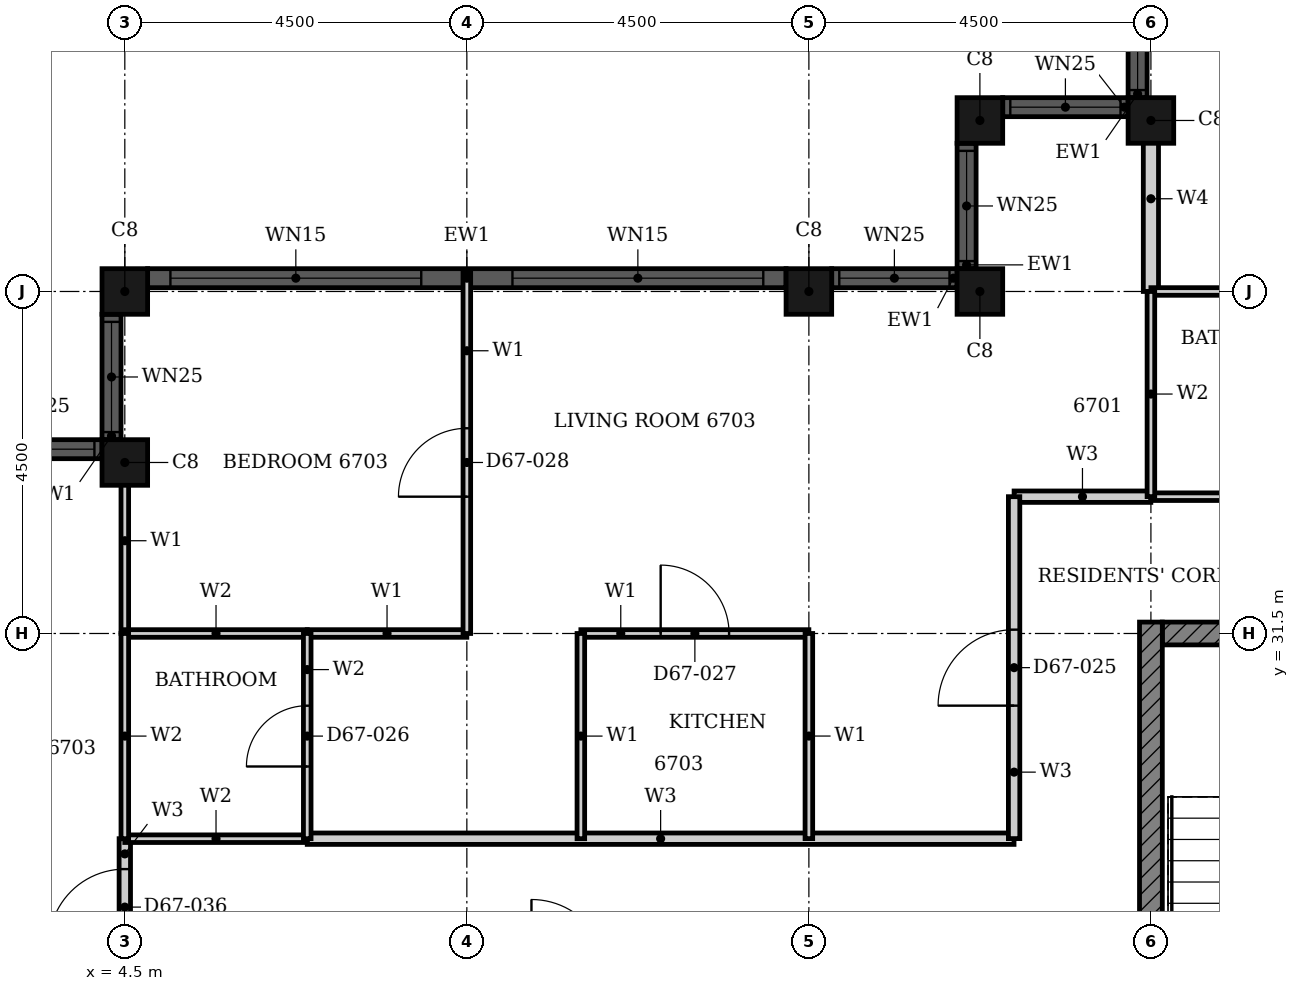
"""IFC4 building model, lengths in metres.
Left out: names, types, materials, properties, quantities, classifications, styles, units other than length and angle.
Written with IfcOpenShell. Run it as: python <this file> out.ifc"""

import sys

from ifc_helpers import new_model, si_unit, direction, frame, frame_2d, origin, origin_2d, place, context, subcontext, project, spatial, rectangle, hollow_rectangle, extrude, element, fill, save


model = new_model("IFC4")
c1 = context("Model", 3, precision=1e-05, world=origin(), true_north=direction((0.0, 1.0)))
c2 = subcontext(c1, "Body", "Model", "MODEL_VIEW")
j1 = project(units=[si_unit("LENGTHUNIT", "METRE"), si_unit("PLANEANGLEUNIT", "RADIAN")], contexts=[c1])
p1 = place(None, origin())
s1 = spatial("IfcSite", under=j1, at=p1, CompositionType="ELEMENT")
p2 = place(p1, origin())
s2 = spatial("IfcBuilding", under=s1, at=p2, CompositionType="ELEMENT")
p3 = place(p2, frame((0.0, 0.0, 263.8)))
s3 = spatial("IfcBuildingStorey", under=s2, at=p3, CompositionType="ELEMENT", Elevation=263.8)
for number, where, z_axis, x_axis in (
    (1, (18.0, 38.25, 0.0), (0.0, 0.0, 1.0), (1.0, 0.0, 0.0)),
    (2, (15.75, 38.25, 0.0), (0.0, 0.0, 1.0), (1.0, 0.0, 0.0)),
    (3, (15.75, 36.0, 0.0), (0.0, 0.0, 1.0), (1.0, 0.0, 0.0)),
    (4, (13.5, 36.0, 0.0), (0.0, 0.0, 1.0), (1.0, 0.0, 0.0)),
    (5, (4.5, 36.0, 0.0), (0.0, 0.0, 1.0), (1.0, 0.0, 0.0)),
    (6, (4.5, 33.75, 0.0), (0.0, 0.0, 1.0), (1.0, 0.0, 0.0)),
):
    element("IfcColumn", number, at=place(p3, frame(where, z_axis=z_axis, x_axis=x_axis)), inside=s3, PredefinedType="COLUMN", context=c2, shape_type="SweptSolid", body=[
        extrude(hollow_rectangle(XDim=0.6, YDim=0.6, WallThickness=0.02, at=origin_2d()), origin(), (0.0, 0.0, 1.0), 3.7),
    ])
p4 = place(p3, frame((17.825, 40.2, 0.0), z_axis=(0.0, 0.0, 1.0), x_axis=(0.0, -1.0, 0.0)))
e7 = element("IfcWall", 7, at=p4, inside=s3, PredefinedType="SOLIDWALL", context=c2, shape_type="SweptSolid", body=[
    extrude(rectangle(XDim=1.65, YDim=0.25, at=frame_2d((0.825, 0.0))), origin(), (0.0, 0.0, 1.0), 3.7),
])
p5 = place(p4, frame((0.1, 0.0, 0.9)))
e8 = element("IfcOpeningElement", 8, at=p5, cuts=e7, PredefinedType="OPENING", context=c2, shape_type="SweptSolid", body=[
    extrude(rectangle(XDim=1.45, YDim=1.85, at=frame_2d((0.725, 0.925))), frame((0.0, 0.135, 0.0), z_axis=(0.0, -1.0, 0.0), x_axis=(1.0, 0.0, 0.0)), (0.0, 0.0, 1.0), 0.27),
])
p6 = place(p3, frame((17.7, 38.425, 0.0), z_axis=(0.0, 0.0, 1.0), x_axis=(-1.0, 0.0, 0.0)))
e9 = element("IfcWall", 9, at=p6, inside=s3, PredefinedType="SOLIDWALL", context=c2, shape_type="SweptSolid", body=[
    extrude(rectangle(XDim=1.65, YDim=0.25, at=frame_2d((0.825, 0.0))), origin(), (0.0, 0.0, 1.0), 3.7),
])
p7 = place(p6, frame((0.1, 0.0, 0.9)))
e10 = element("IfcOpeningElement", 10, at=p7, cuts=e9, PredefinedType="OPENING", context=c2, shape_type="SweptSolid", body=[
    extrude(rectangle(XDim=1.45, YDim=1.85, at=frame_2d((0.725, 0.925))), frame((0.0, 0.135, 0.0), z_axis=(0.0, -1.0, 0.0), x_axis=(1.0, 0.0, 0.0)), (0.0, 0.0, 1.0), 0.27),
])
p8 = place(p3, frame((15.575, 37.95, 0.0), z_axis=(0.0, 0.0, 1.0), x_axis=(0.0, -1.0, 0.0)))
e11 = element("IfcWall", 11, at=p8, inside=s3, PredefinedType="SOLIDWALL", context=c2, shape_type="SweptSolid", body=[
    extrude(rectangle(XDim=1.65, YDim=0.25, at=frame_2d((0.825, 0.0))), origin(), (0.0, 0.0, 1.0), 3.7),
])
p9 = place(p8, frame((0.1, 0.0, 0.9)))
e12 = element("IfcOpeningElement", 12, at=p9, cuts=e11, PredefinedType="OPENING", context=c2, shape_type="SweptSolid", body=[
    extrude(rectangle(XDim=1.45, YDim=1.85, at=frame_2d((0.725, 0.925))), frame((0.0, 0.135, 0.0), z_axis=(0.0, -1.0, 0.0), x_axis=(1.0, 0.0, 0.0)), (0.0, 0.0, 1.0), 0.27),
])
p10 = place(p3, frame((15.45, 36.175, 0.0), z_axis=(0.0, 0.0, 1.0), x_axis=(-1.0, 0.0, 0.0)))
e13 = element("IfcWall", 13, at=p10, inside=s3, PredefinedType="SOLIDWALL", context=c2, shape_type="SweptSolid", body=[
    extrude(rectangle(XDim=1.65, YDim=0.25, at=frame_2d((0.825, 0.0))), origin(), (0.0, 0.0, 1.0), 3.7),
])
p11 = place(p10, frame((0.1, 0.0, 0.9)))
e14 = element("IfcOpeningElement", 14, at=p11, cuts=e13, PredefinedType="OPENING", context=c2, shape_type="SweptSolid", body=[
    extrude(rectangle(XDim=1.45, YDim=1.85, at=frame_2d((0.725, 0.925))), frame((0.0, 0.135, 0.0), z_axis=(0.0, -1.0, 0.0), x_axis=(1.0, 0.0, 0.0)), (0.0, 0.0, 1.0), 0.27),
])
p12 = place(p3, frame((13.2, 36.175, 0.0), z_axis=(0.0, 0.0, 1.0), x_axis=(-1.0, 0.0, 0.0)))
e15 = element("IfcWall", 15, at=p12, inside=s3, PredefinedType="SOLIDWALL", context=c2, shape_type="SweptSolid", body=[
    extrude(rectangle(XDim=8.4, YDim=0.25, at=frame_2d((4.2, 0.0))), origin(), (0.0, 0.0, 1.0), 3.7),
])
p13 = place(p12, frame((0.3, 0.0, 0.45)))
e16 = element("IfcOpeningElement", 16, at=p13, cuts=e15, PredefinedType="OPENING", context=c2, shape_type="SweptSolid", body=[
    extrude(rectangle(XDim=3.3, YDim=2.3, at=frame_2d((1.65, 1.15))), frame((0.0, 0.135, 0.0), z_axis=(0.0, -1.0, 0.0), x_axis=(1.0, 0.0, 0.0)), (0.0, 0.0, 1.0), 0.27),
])
p14 = place(p12, frame((4.8, 0.0, 0.45)))
e17 = element("IfcOpeningElement", 17, at=p14, cuts=e15, PredefinedType="OPENING", context=c2, shape_type="SweptSolid", body=[
    extrude(rectangle(XDim=3.3, YDim=2.3, at=frame_2d((1.65, 1.15))), frame((0.0, 0.135, 0.0), z_axis=(0.0, -1.0, 0.0), x_axis=(1.0, 0.0, 0.0)), (0.0, 0.0, 1.0), 0.27),
])
p15 = place(p3, frame((4.325, 35.7, 0.0), z_axis=(0.0, 0.0, 1.0), x_axis=(0.0, -1.0, 0.0)))
e18 = element("IfcWall", 18, at=p15, inside=s3, PredefinedType="SOLIDWALL", context=c2, shape_type="SweptSolid", body=[
    extrude(rectangle(XDim=1.65, YDim=0.25, at=frame_2d((0.825, 0.0))), origin(), (0.0, 0.0, 1.0), 3.7),
])
p16 = place(p15, frame((0.1, 0.0, 0.9)))
e19 = element("IfcOpeningElement", 19, at=p16, cuts=e18, PredefinedType="OPENING", context=c2, shape_type="SweptSolid", body=[
    extrude(rectangle(XDim=1.45, YDim=1.85, at=frame_2d((0.725, 0.925))), frame((0.0, 0.135, 0.0), z_axis=(0.0, -1.0, 0.0), x_axis=(1.0, 0.0, 0.0)), (0.0, 0.0, 1.0), 0.27),
])
p17 = place(p3, frame((4.2, 33.925, 0.0), z_axis=(0.0, 0.0, 1.0), x_axis=(-1.0, 0.0, 0.0)))
e20 = element("IfcWall", 20, at=p17, inside=s3, PredefinedType="SOLIDWALL", context=c2, shape_type="SweptSolid", body=[
    extrude(rectangle(XDim=1.65, YDim=0.25, at=frame_2d((0.825, 0.0))), origin(), (0.0, 0.0, 1.0), 3.7),
])
p18 = place(p17, frame((0.1, 0.0, 0.9)))
e21 = element("IfcOpeningElement", 21, at=p18, cuts=e20, PredefinedType="OPENING", context=c2, shape_type="SweptSolid", body=[
    extrude(rectangle(XDim=1.45, YDim=1.85, at=frame_2d((0.725, 0.925))), frame((0.0, 0.135, 0.0), z_axis=(0.0, -1.0, 0.0), x_axis=(1.0, 0.0, 0.0)), (0.0, 0.0, 1.0), 0.27),
])
p19 = place(p3, frame((18.15, 31.5, 0.0), z_axis=(0.0, 0.0, 1.0), x_axis=(1.0, 0.0, 0.0)))
e22 = element("IfcWall", 22, at=p19, inside=s3, PredefinedType="SHEAR", context=c2, shape_type="SweptSolid", body=[
    extrude(rectangle(XDim=9.368, YDim=0.3, at=frame_2d((4.684, 0.0))), origin(), (0.0, 0.0, 1.0), 3.4),
])
p20 = place(p19, frame((4.736, 0.0, 0.0)))
e23 = element("IfcOpeningElement", 23, at=p20, cuts=e22, PredefinedType="OPENING", context=c2, shape_type="SweptSolid", body=[
    extrude(rectangle(XDim=1.8, YDim=2.1, at=frame_2d((0.9, 1.05))), frame((0.0, 0.16, 0.0), z_axis=(0.0, -1.0, 0.0), x_axis=(1.0, 0.0, 0.0)), (0.0, 0.0, 1.0), 0.32),
])
p21 = place(p3, frame((18.0, 22.35, 0.0), z_axis=(0.0, 0.0, 1.0), x_axis=(0.0, 1.0, 0.0)))
e24 = element("IfcWall", 24, at=p21, inside=s3, PredefinedType="SHEAR", context=c2, shape_type="SweptSolid", body=[
    extrude(rectangle(XDim=9.3, YDim=0.3, at=frame_2d((4.65, 0.0))), origin(), (0.0, 0.0, 1.0), 3.4),
])
p22 = place(p3, frame((6.9, 28.8, 0.0), z_axis=(0.0, 0.0, 1.0), x_axis=(1.0, 0.0, 0.0)))
e25 = element("IfcWall", 25, at=p22, inside=s3, PredefinedType="PARTITIONING", context=c2, shape_type="SweptSolid", body=[
    extrude(rectangle(XDim=9.299, YDim=0.15, at=frame_2d((4.649, 0.0))), origin(), (0.0, 0.0, 1.0), 3.4),
])
p23 = place(p3, frame((16.2, 33.3, 0.0), z_axis=(0.0, 0.0, 1.0), x_axis=(1.0, 0.0, 0.0)))
e26 = element("IfcWall", 26, at=p23, inside=s3, PredefinedType="PARTITIONING", context=c2, shape_type="SweptSolid", body=[
    extrude(rectangle(XDim=1.799, YDim=0.15, at=frame_2d((0.899, 0.0))), origin(), (0.0, 0.0, 1.0), 3.4),
])
p24 = place(p3, frame((16.2, 28.801, 0.0), z_axis=(0.0, 0.0, 1.0), x_axis=(0.0, 1.0, 0.0)))
e27 = element("IfcWall", 27, at=p24, inside=s3, PredefinedType="PARTITIONING", context=c2, shape_type="SweptSolid", body=[
    extrude(rectangle(XDim=4.499, YDim=0.15, at=frame_2d((2.25, 0.0))), origin(), (0.0, 0.0, 1.0), 3.4),
])
p25 = place(p24, frame((1.75, 0.0, 0.0)))
e28 = element("IfcOpeningElement", 28, at=p25, cuts=e27, PredefinedType="OPENING", context=c2, shape_type="SweptSolid", body=[
    extrude(rectangle(XDim=1.0, YDim=2.2, at=frame_2d((0.5, 1.1))), frame((0.0, 0.085, 0.0), z_axis=(0.0, -1.0, 0.0), x_axis=(1.0, 0.0, 0.0)), (0.0, 0.0, 1.0), 0.17),
])
p26 = place(p3, frame((4.5, 27.0, 0.0), z_axis=(0.0, 0.0, 1.0), x_axis=(0.0, 1.0, 0.0)))
e29 = element("IfcWall", 29, at=p26, inside=s3, PredefinedType="PARTITIONING", context=c2, shape_type="SweptSolid", body=[
    extrude(rectangle(XDim=1.8, YDim=0.15, at=frame_2d((0.9, 0.0))), origin(), (0.0, 0.0, 1.0), 3.4),
])
p27 = place(p26, frame((0.4, 0.0, 0.0)))
e30 = element("IfcOpeningElement", 30, at=p27, cuts=e29, PredefinedType="OPENING", context=c2, shape_type="SweptSolid", body=[
    extrude(rectangle(XDim=1.0, YDim=2.1, at=frame_2d((0.5, 1.05))), frame((0.0, 0.085, 0.0), z_axis=(0.0, -1.0, 0.0), x_axis=(1.0, 0.0, 0.0)), (0.0, 0.0, 1.0), 0.17),
])
p28 = place(p3, frame((6.9, 31.5, 0.0), z_axis=(0.0, 0.0, 1.0), x_axis=(1.0, 0.0, 0.0)))
e31 = element("IfcWall", 31, at=p28, inside=s3, PredefinedType="PARTITIONING", context=c2, shape_type="SweptSolid", body=[
    extrude(rectangle(XDim=2.1, YDim=0.1, at=frame_2d((1.05, 0.0))), origin(), (0.0, 0.0, 1.0), 2.68),
])
p29 = place(p3, frame((10.5, 31.5, 0.0), z_axis=(0.0, 0.0, 1.0), x_axis=(1.0, 0.0, 0.0)))
e32 = element("IfcWall", 32, at=p29, inside=s3, PredefinedType="PARTITIONING", context=c2, shape_type="SweptSolid", body=[
    extrude(rectangle(XDim=3.0, YDim=0.1, at=frame_2d((1.5, 0.0))), origin(), (0.0, 0.0, 1.0), 2.68),
])
p30 = place(p29, frame((1.05, 0.0, 0.0)))
e33 = element("IfcOpeningElement", 33, at=p30, cuts=e32, PredefinedType="OPENING", context=c2, shape_type="SweptSolid", body=[
    extrude(rectangle(XDim=0.9, YDim=2.1, at=frame_2d((0.45, 1.05))), frame((0.0, 0.06, 0.0), z_axis=(0.0, -1.0, 0.0), x_axis=(1.0, 0.0, 0.0)), (0.0, 0.0, 1.0), 0.12),
])
p31 = place(p3, frame((10.5, 28.8, 0.0), z_axis=(0.0, 0.0, 1.0), x_axis=(0.0, 1.0, 0.0)))
e34 = element("IfcWall", 34, at=p31, inside=s3, PredefinedType="PARTITIONING", context=c2, shape_type="SweptSolid", body=[
    extrude(rectangle(XDim=2.7, YDim=0.1, at=frame_2d((1.35, 0.0))), origin(), (0.0, 0.0, 1.0), 3.4),
])
p32 = place(p3, frame((13.5, 28.801, 0.0), z_axis=(0.0, 0.0, 1.0), x_axis=(0.0, 1.0, 0.0)))
e35 = element("IfcWall", 35, at=p32, inside=s3, PredefinedType="PARTITIONING", context=c2, shape_type="SweptSolid", body=[
    extrude(rectangle(XDim=2.699, YDim=0.1, at=frame_2d((1.35, 0.0))), origin(), (0.0, 0.0, 1.0), 2.48),
])
p33 = place(p3, frame((4.5, 31.501, 0.0), z_axis=(0.0, 0.0, 1.0), x_axis=(0.0, 1.0, 0.0)))
e36 = element("IfcWall", 36, at=p33, inside=s3, PredefinedType="PARTITIONING", context=c2, shape_type="SweptSolid", body=[
    extrude(rectangle(XDim=2.439, YDim=0.1, at=frame_2d((1.219, 0.0))), origin(), (0.0, 0.0, 1.0), 3.4),
])
p34 = place(p3, frame((9.0, 31.5, 0.0), z_axis=(0.0, 0.0, 1.0), x_axis=(0.0, 1.0, 0.0)))
e37 = element("IfcWall", 37, at=p34, inside=s3, PredefinedType="PARTITIONING", context=c2, shape_type="SweptSolid", body=[
    extrude(rectangle(XDim=4.74, YDim=0.1, at=frame_2d((2.37, 0.0))), origin(), (0.0, 0.0, 1.0), 3.4),
])
p35 = place(p34, frame((1.8, 0.0, 0.0)))
e38 = element("IfcOpeningElement", 38, at=p35, cuts=e37, PredefinedType="OPENING", context=c2, shape_type="SweptSolid", body=[
    extrude(rectangle(XDim=0.9, YDim=2.1, at=frame_2d((0.45, 1.05))), frame((0.0, 0.06, 0.0), z_axis=(0.0, -1.0, 0.0), x_axis=(1.0, 0.0, 0.0)), (0.0, 0.0, 1.0), 0.12),
])
p36 = place(p3, frame((18.0, 36.0, 0.0), z_axis=(0.0, 0.0, 1.0), x_axis=(0.0, 1.0, 0.0)))
e39 = element("IfcWall", 39, at=p36, inside=s3, PredefinedType="PARTITIONING", context=c2, shape_type="SweptSolid", body=[
    extrude(rectangle(XDim=2.44, YDim=0.2, at=frame_2d((1.22, 0.0))), origin(), (0.0, 0.0, 1.0), 3.4),
])
p37 = place(p3, frame((4.5, 28.8, 0.0), z_axis=(0.0, 0.0, 1.0), x_axis=(1.0, 0.0, 0.0)))
e40 = element("IfcWall", 40, at=p37, inside=s3, PredefinedType="PARTITIONING", context=c2, shape_type="SweptSolid", body=[
    extrude(rectangle(XDim=2.4, YDim=0.1, at=frame_2d((1.2, 0.0))), origin(), (0.0, 0.0, 1.0), 3.4),
])
p38 = place(p3, frame((4.5, 31.5, 0.0), z_axis=(0.0, 0.0, 1.0), x_axis=(1.0, 0.0, 0.0)))
e41 = element("IfcWall", 41, at=p38, inside=s3, PredefinedType="PARTITIONING", context=c2, shape_type="SweptSolid", body=[
    extrude(rectangle(XDim=2.4, YDim=0.1, at=frame_2d((1.2, 0.0))), origin(), (0.0, 0.0, 1.0), 2.68),
])
for number, where, z_axis, x_axis in (
    (42, (18.0, 33.3, 0.0), (0.0, 0.0, 1.0), (1.0, 0.0, 0.0)),
    (43, (18.0, 36.0, 0.0), (0.0, 0.0, 1.0), (1.0, 0.0, 0.0)),
):
    element("IfcWall", number, at=place(p3, frame(where, z_axis=z_axis, x_axis=x_axis)), inside=s3, PredefinedType="PARTITIONING", context=c2, shape_type="SweptSolid", body=[
        extrude(rectangle(XDim=2.4, YDim=0.1, at=frame_2d((1.2, 0.0))), origin(), (0.0, 0.0, 1.0), 3.4),
    ])
p39 = place(p3, frame((18.0, 33.301, 0.0), z_axis=(0.0, 0.0, 1.0), x_axis=(0.0, 1.0, 0.0)))
e44 = element("IfcWall", 44, at=p39, inside=s3, PredefinedType="PARTITIONING", context=c2, shape_type="SweptSolid", body=[
    extrude(rectangle(XDim=2.699, YDim=0.1, at=frame_2d((1.35, 0.0))), origin(), (0.0, 0.0, 1.0), 3.4),
])
p40 = place(p3, frame((4.5, 28.8, 0.0), z_axis=(0.0, 0.0, 1.0), x_axis=(0.0, 1.0, 0.0)))
e45 = element("IfcWall", 45, at=p40, inside=s3, PredefinedType="PARTITIONING", context=c2, shape_type="SweptSolid", body=[
    extrude(rectangle(XDim=2.7, YDim=0.1, at=frame_2d((1.35, 0.0))), origin(), (0.0, 0.0, 1.0), 3.4),
])
p41 = place(p3, frame((6.9, 28.8, 0.0), z_axis=(0.0, 0.0, 1.0), x_axis=(0.0, 1.0, 0.0)))
e46 = element("IfcWall", 46, at=p41, inside=s3, PredefinedType="PARTITIONING", context=c2, shape_type="SweptSolid", body=[
    extrude(rectangle(XDim=2.7, YDim=0.1, at=frame_2d((1.35, 0.0))), origin(), (0.0, 0.0, 1.0), 3.4),
])
p42 = place(p41, frame((0.95, 0.0, 0.0)))
e47 = element("IfcOpeningElement", 47, at=p42, cuts=e46, PredefinedType="OPENING", context=c2, shape_type="SweptSolid", body=[
    extrude(rectangle(XDim=0.8, YDim=2.1, at=frame_2d((0.4, 1.05))), frame((0.0, 0.06, 0.0), z_axis=(0.0, -1.0, 0.0), x_axis=(1.0, 0.0, 0.0)), (0.0, 0.0, 1.0), 0.12),
])
p43 = place(p5, origin())
e48 = element("IfcWindow", 48, at=p43, inside=s3, PartitioningType="SINGLE_PANEL", PredefinedType="WINDOW", context=c2, shape_type="SweptSolid", body=[
    extrude(rectangle(XDim=1.45, YDim=1.85, at=frame_2d((0.725, 0.925))), frame((0.0, 0.03, 0.0), z_axis=(0.0, -1.0, 0.0), x_axis=(1.0, 0.0, 0.0)), (0.0, 0.0, 1.0), 0.06),
])
fill(e8, e48)
p44 = place(p7, origin())
e49 = element("IfcWindow", 49, at=p44, inside=s3, PartitioningType="SINGLE_PANEL", PredefinedType="WINDOW", context=c2, shape_type="SweptSolid", body=[
    extrude(rectangle(XDim=1.45, YDim=1.85, at=frame_2d((0.725, 0.925))), frame((0.0, 0.03, 0.0), z_axis=(0.0, -1.0, 0.0), x_axis=(1.0, 0.0, 0.0)), (0.0, 0.0, 1.0), 0.06),
])
fill(e10, e49)
p45 = place(p9, origin())
e50 = element("IfcWindow", 50, at=p45, inside=s3, PartitioningType="SINGLE_PANEL", PredefinedType="WINDOW", context=c2, shape_type="SweptSolid", body=[
    extrude(rectangle(XDim=1.45, YDim=1.85, at=frame_2d((0.725, 0.925))), frame((0.0, 0.03, 0.0), z_axis=(0.0, -1.0, 0.0), x_axis=(1.0, 0.0, 0.0)), (0.0, 0.0, 1.0), 0.06),
])
fill(e12, e50)
p46 = place(p11, origin())
e51 = element("IfcWindow", 51, at=p46, inside=s3, PartitioningType="SINGLE_PANEL", PredefinedType="WINDOW", context=c2, shape_type="SweptSolid", body=[
    extrude(rectangle(XDim=1.45, YDim=1.85, at=frame_2d((0.725, 0.925))), frame((0.0, 0.03, 0.0), z_axis=(0.0, -1.0, 0.0), x_axis=(1.0, 0.0, 0.0)), (0.0, 0.0, 1.0), 0.06),
])
fill(e14, e51)
p47 = place(p13, origin())
e52 = element("IfcWindow", 52, at=p47, inside=s3, PartitioningType="SINGLE_PANEL", PredefinedType="WINDOW", context=c2, shape_type="SweptSolid", body=[
    extrude(rectangle(XDim=3.3, YDim=2.3, at=frame_2d((1.65, 1.15))), frame((0.0, 0.03, 0.0), z_axis=(0.0, -1.0, 0.0), x_axis=(1.0, 0.0, 0.0)), (0.0, 0.0, 1.0), 0.06),
])
fill(e16, e52)
p48 = place(p14, origin())
e53 = element("IfcWindow", 53, at=p48, inside=s3, PartitioningType="SINGLE_PANEL", PredefinedType="WINDOW", context=c2, shape_type="SweptSolid", body=[
    extrude(rectangle(XDim=3.3, YDim=2.3, at=frame_2d((1.65, 1.15))), frame((0.0, 0.03, 0.0), z_axis=(0.0, -1.0, 0.0), x_axis=(1.0, 0.0, 0.0)), (0.0, 0.0, 1.0), 0.06),
])
fill(e17, e53)
p49 = place(p16, origin())
e54 = element("IfcWindow", 54, at=p49, inside=s3, PartitioningType="SINGLE_PANEL", PredefinedType="WINDOW", context=c2, shape_type="SweptSolid", body=[
    extrude(rectangle(XDim=1.45, YDim=1.85, at=frame_2d((0.725, 0.925))), frame((0.0, 0.03, 0.0), z_axis=(0.0, -1.0, 0.0), x_axis=(1.0, 0.0, 0.0)), (0.0, 0.0, 1.0), 0.06),
])
fill(e19, e54)
p50 = place(p18, origin())
e55 = element("IfcWindow", 55, at=p50, inside=s3, PartitioningType="SINGLE_PANEL", PredefinedType="WINDOW", context=c2, shape_type="SweptSolid", body=[
    extrude(rectangle(XDim=1.45, YDim=1.85, at=frame_2d((0.725, 0.925))), frame((0.0, 0.03, 0.0), z_axis=(0.0, -1.0, 0.0), x_axis=(1.0, 0.0, 0.0)), (0.0, 0.0, 1.0), 0.06),
])
fill(e21, e55)
p51 = place(p25, origin())
e56 = element("IfcDoor", 56, at=p51, inside=s3, OperationType="SINGLE_SWING_LEFT", PredefinedType="DOOR", context=c2, shape_type="SweptSolid", body=[
    extrude(rectangle(XDim=1.0, YDim=2.2, at=frame_2d((0.5, 1.1))), frame((0.0, 0.025, 0.0), z_axis=(0.0, -1.0, 0.0), x_axis=(1.0, 0.0, 0.0)), (0.0, 0.0, 1.0), 0.05),
])
fill(e28, e56)
p52 = place(p42, origin())
e57 = element("IfcDoor", 57, at=p52, inside=s3, OperationType="SINGLE_SWING_LEFT", PredefinedType="DOOR", context=c2, shape_type="SweptSolid", body=[
    extrude(rectangle(XDim=0.8, YDim=2.1, at=frame_2d((0.4, 1.05))), frame((0.0, 0.025, 0.0), z_axis=(0.0, -1.0, 0.0), x_axis=(1.0, 0.0, 0.0)), (0.0, 0.0, 1.0), 0.05),
])
fill(e47, e57)
p53 = place(p30, origin())
e58 = element("IfcDoor", 58, at=p53, inside=s3, OperationType="SINGLE_SWING_LEFT", PredefinedType="DOOR", context=c2, shape_type="SweptSolid", body=[
    extrude(rectangle(XDim=0.9, YDim=2.1, at=frame_2d((0.45, 1.05))), frame((0.0, 0.025, 0.0), z_axis=(0.0, -1.0, 0.0), x_axis=(1.0, 0.0, 0.0)), (0.0, 0.0, 1.0), 0.05),
])
fill(e33, e58)
p54 = place(p35, origin())
e59 = element("IfcDoor", 59, at=p54, inside=s3, OperationType="SINGLE_SWING_LEFT", PredefinedType="DOOR", context=c2, shape_type="SweptSolid", body=[
    extrude(rectangle(XDim=0.9, YDim=2.1, at=frame_2d((0.45, 1.05))), frame((0.0, 0.025, 0.0), z_axis=(0.0, -1.0, 0.0), x_axis=(1.0, 0.0, 0.0)), (0.0, 0.0, 1.0), 0.05),
])
fill(e38, e59)
p55 = place(p27, origin())
e60 = element("IfcDoor", 60, at=p55, inside=s3, OperationType="SINGLE_SWING_LEFT", PredefinedType="DOOR", context=c2, shape_type="SweptSolid", body=[
    extrude(rectangle(XDim=1.0, YDim=2.1, at=frame_2d((0.5, 1.05))), frame((0.0, 0.025, 0.0), z_axis=(0.0, -1.0, 0.0), x_axis=(1.0, 0.0, 0.0)), (0.0, 0.0, 1.0), 0.05),
])
fill(e30, e60)
save(model, sys.argv[1])
